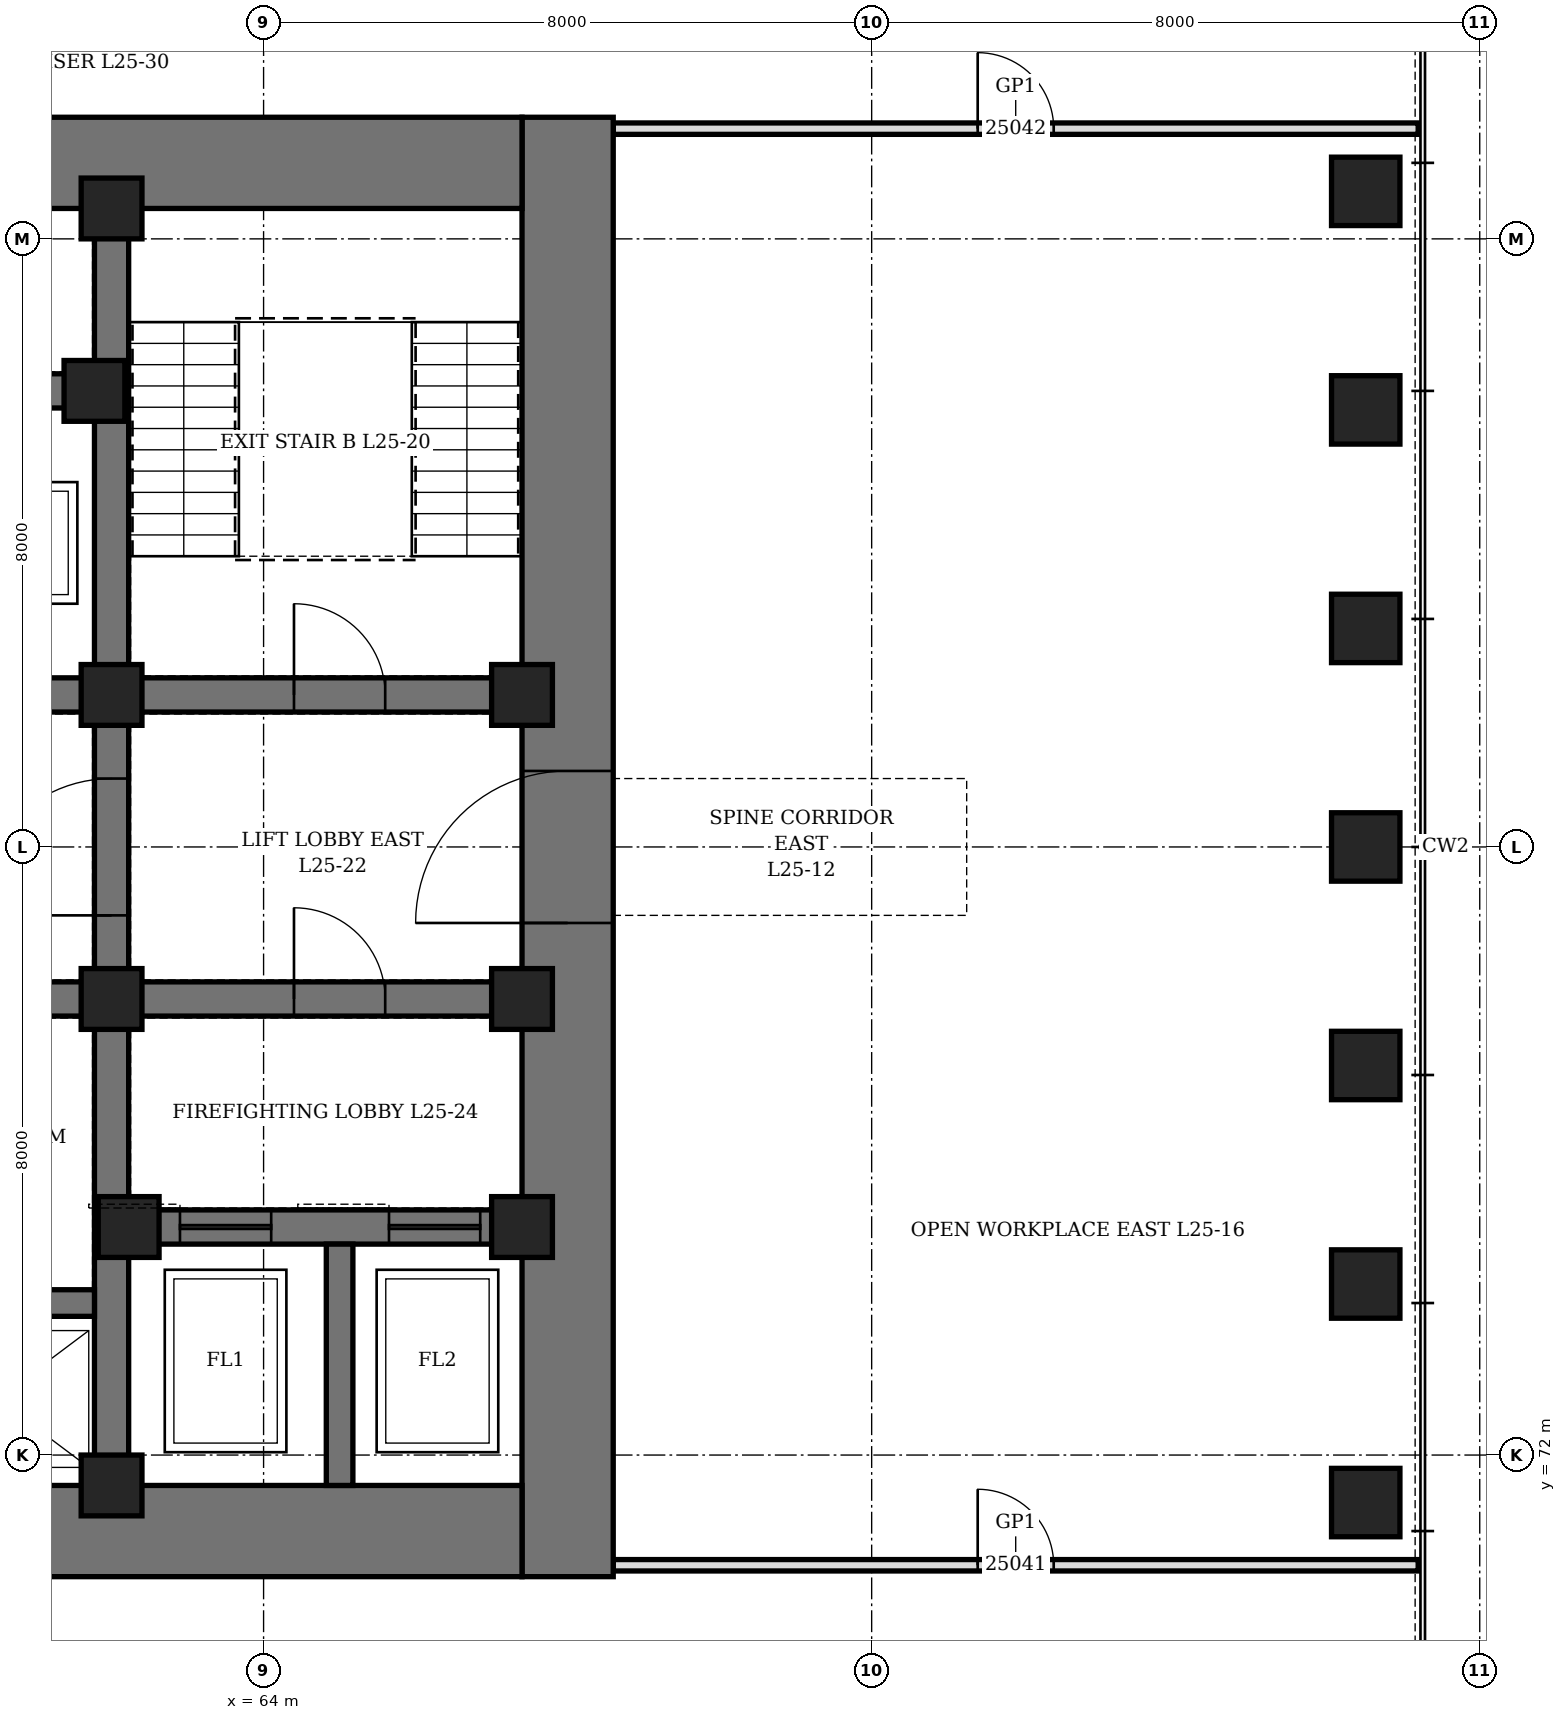
"""IFC4 building model, lengths in metres.
Left out: names, types, materials, properties, quantities, classifications, styles, units other than length and angle.
Written with IfcOpenShell. Run it as: python <this file> out.ifc"""

import sys

from ifc_helpers import new_model, si_unit, direction, frame, frame_2d, origin, origin_2d, place, context, subcontext, project, spatial, rectangle, hollow_rectangle, extrude, element, fill, save


model = new_model("IFC4")
c1 = context("Model", 3, precision=1e-05, world=origin(), true_north=direction((0.0, 1.0)))
c2 = subcontext(c1, "Body", "Model", "MODEL_VIEW")
j1 = project(units=[si_unit("LENGTHUNIT", "METRE"), si_unit("PLANEANGLEUNIT", "RADIAN")], contexts=[c1])
p1 = place(None, origin())
s1 = spatial("IfcSite", under=j1, at=p1, CompositionType="ELEMENT")
p2 = place(p1, origin())
s2 = spatial("IfcBuilding", under=s1, at=p2, CompositionType="ELEMENT")
p3 = place(p2, frame((0.0, 0.0, 116.5)))
s3 = spatial("IfcBuildingStorey", under=s2, at=p3, CompositionType="ELEMENT", Elevation=116.5)
for number, where, z_axis, x_axis in (
    (1, (78.5, 71.375, 0.0), (0.0, 0.0, 1.0), (0.0, 1.0, 0.0)),
    (2, (78.5, 74.25, 0.0), (0.0, 0.0, 1.0), (0.0, 1.0, 0.0)),
    (3, (78.5, 77.125, 0.0), (0.0, 0.0, 1.0), (0.0, 1.0, 0.0)),
    (4, (78.5, 80.0, 0.0), (0.0, 0.0, 1.0), (0.0, 1.0, 0.0)),
    (5, (78.5, 82.875, 0.0), (0.0, 0.0, 1.0), (0.0, 1.0, 0.0)),
    (6, (78.5, 85.75, 0.0), (0.0, 0.0, 1.0), (0.0, 1.0, 0.0)),
    (7, (78.5, 88.625, 0.0), (0.0, 0.0, 1.0), (0.0, 1.0, 0.0)),
):
    element("IfcColumn", number, at=place(p3, frame(where, z_axis=z_axis, x_axis=x_axis)), inside=s3, PredefinedType="COLUMN", context=c2, shape_type="SweptSolid", body=[
        extrude(hollow_rectangle(XDim=0.9, YDim=0.9, WallThickness=0.15, at=origin_2d()), origin(), (0.0, 0.0, 1.0), 4.2),
    ])
p4 = place(p3, frame((68.0, 70.4, 0.0), z_axis=(0.0, 0.0, 1.0), x_axis=(0.0, 1.0, 0.0)))
e8 = element("IfcWall", 8, at=p4, inside=s3, PredefinedType="SHEAR", context=c2, shape_type="SweptSolid", body=[
    extrude(rectangle(XDim=19.2, YDim=1.2, at=frame_2d((9.6, 0.0))), origin(), (0.0, 0.0, 1.0), 4.2),
])
p5 = place(p4, frame((8.6, 0.0, 0.0)))
e9 = element("IfcOpeningElement", 9, at=p5, cuts=e8, PredefinedType="OPENING", context=c2, shape_type="SweptSolid", body=[
    extrude(rectangle(XDim=2.0, YDim=2.4, at=frame_2d((1.0, 1.2))), frame((0.0, 0.61, 0.0), z_axis=(0.0, -1.0, 0.0), x_axis=(1.0, 0.0, 0.0)), (0.0, 0.0, 1.0), 1.22),
])
p6 = place(p3, frame((44.6, 71.0, 0.0), z_axis=(0.0, 0.0, 1.0), x_axis=(1.0, 0.0, 0.0)))
e10 = element("IfcWall", 10, at=p6, inside=s3, PredefinedType="SHEAR", context=c2, shape_type="SweptSolid", body=[
    extrude(rectangle(XDim=22.8, YDim=1.2, at=frame_2d((11.4, 0.0))), origin(), (0.0, 0.0, 1.0), 4.2),
])
p7 = place(p3, frame((44.6, 89.0, 0.0), z_axis=(0.0, 0.0, 1.0), x_axis=(1.0, 0.0, 0.0)))
e11 = element("IfcWall", 11, at=p7, inside=s3, PredefinedType="SHEAR", context=c2, shape_type="SweptSolid", body=[
    extrude(rectangle(XDim=22.8, YDim=1.2, at=frame_2d((11.4, 0.0))), origin(), (0.0, 0.0, 1.0), 4.2),
])
p8 = place(p7, frame((9.475, 0.0, 0.0)))
e12 = element("IfcOpeningElement", 12, at=p8, cuts=e11, PredefinedType="OPENING", context=c2, shape_type="SweptSolid", body=[
    extrude(rectangle(XDim=1.0, YDim=2.1, at=frame_2d((0.5, 1.05))), frame((0.0, 0.61, 0.0), z_axis=(0.0, -1.0, 0.0), x_axis=(1.0, 0.0, 0.0)), (0.0, 0.0, 1.0), 1.22),
])
p9 = place(p7, frame((6.65, 0.0, 0.0)))
e13 = element("IfcOpeningElement", 13, at=p9, cuts=e11, PredefinedType="OPENING", context=c2, shape_type="SweptSolid", body=[
    extrude(rectangle(XDim=0.9, YDim=2.1, at=frame_2d((0.45, 1.05))), frame((0.0, 0.61, 0.0), z_axis=(0.0, -1.0, 0.0), x_axis=(1.0, 0.0, 0.0)), (0.0, 0.0, 1.0), 1.22),
])
p10 = place(p7, frame((12.025, 0.0, 0.0)))
e14 = element("IfcOpeningElement", 14, at=p10, cuts=e11, PredefinedType="OPENING", context=c2, shape_type="SweptSolid", body=[
    extrude(rectangle(XDim=0.9, YDim=2.1, at=frame_2d((0.45, 1.05))), frame((0.0, 0.61, 0.0), z_axis=(0.0, -1.0, 0.0), x_axis=(1.0, 0.0, 0.0)), (0.0, 0.0, 1.0), 1.22),
])
p11 = place(p7, frame((13.962, 0.0, 0.0)))
e15 = element("IfcOpeningElement", 15, at=p11, cuts=e11, PredefinedType="OPENING", context=c2, shape_type="SweptSolid", body=[
    extrude(rectangle(XDim=0.9, YDim=2.1, at=frame_2d((0.45, 1.05))), frame((0.0, 0.61, 0.0), z_axis=(0.0, -1.0, 0.0), x_axis=(1.0, 0.0, 0.0)), (0.0, 0.0, 1.0), 1.22),
])
p12 = place(p3, frame((62.0, 71.6, 0.0), z_axis=(0.0, 0.0, 1.0), x_axis=(0.0, 1.0, 0.0)))
e16 = element("IfcWall", 16, at=p12, inside=s3, PredefinedType="SHEAR", context=c2, shape_type="SweptSolid", body=[
    extrude(rectangle(XDim=16.8, YDim=0.45, at=frame_2d((8.4, 0.0))), origin(), (0.0, 0.0, 1.0), 4.2),
])
p13 = place(p12, frame((7.5, 0.0, 0.0)))
e17 = element("IfcOpeningElement", 17, at=p13, cuts=e16, PredefinedType="OPENING", context=c2, shape_type="SweptSolid", body=[
    extrude(rectangle(XDim=1.8, YDim=2.4, at=frame_2d((0.9, 1.2))), frame((0.0, 0.235, 0.0), z_axis=(0.0, -1.0, 0.0), x_axis=(1.0, 0.0, 0.0)), (0.0, 0.0, 1.0), 0.47),
])
p14 = place(p3, frame((62.225, 75.0, 0.0), z_axis=(0.0, 0.0, 1.0), x_axis=(1.0, 0.0, 0.0)))
e18 = element("IfcWall", 18, at=p14, inside=s3, PredefinedType="SHEAR", context=c2, shape_type="SweptSolid", body=[
    extrude(rectangle(XDim=5.175, YDim=0.45, at=frame_2d((2.587, 0.0))), origin(), (0.0, 0.0, 1.0), 4.2),
])
p15 = place(p14, frame((0.675, 0.0, 0.0)))
e19 = element("IfcOpeningElement", 19, at=p15, cuts=e18, PredefinedType="OPENING", context=c2, shape_type="SweptSolid", body=[
    extrude(rectangle(XDim=1.2, YDim=2.2, at=frame_2d((0.6, 1.1))), frame((0.0, 0.235, 0.0), z_axis=(0.0, -1.0, 0.0), x_axis=(1.0, 0.0, 0.0)), (0.0, 0.0, 1.0), 0.47),
])
p16 = place(p14, frame((3.425, 0.0, 0.0)))
e20 = element("IfcOpeningElement", 20, at=p16, cuts=e18, PredefinedType="OPENING", context=c2, shape_type="SweptSolid", body=[
    extrude(rectangle(XDim=1.2, YDim=2.2, at=frame_2d((0.6, 1.1))), frame((0.0, 0.235, 0.0), z_axis=(0.0, -1.0, 0.0), x_axis=(1.0, 0.0, 0.0)), (0.0, 0.0, 1.0), 0.47),
])
p17 = place(p3, frame((62.225, 78.0, 0.0), z_axis=(0.0, 0.0, 1.0), x_axis=(1.0, 0.0, 0.0)))
e21 = element("IfcWall", 21, at=p17, inside=s3, PredefinedType="SHEAR", context=c2, shape_type="SweptSolid", body=[
    extrude(rectangle(XDim=5.175, YDim=0.45, at=frame_2d((2.587, 0.0))), origin(), (0.0, 0.0, 1.0), 4.2),
])
p18 = place(p17, frame((2.175, 0.0, 0.0)))
e22 = element("IfcOpeningElement", 22, at=p18, cuts=e21, PredefinedType="OPENING", context=c2, shape_type="SweptSolid", body=[
    extrude(rectangle(XDim=1.2, YDim=2.1, at=frame_2d((0.6, 1.05))), frame((0.0, 0.235, 0.0), z_axis=(0.0, -1.0, 0.0), x_axis=(1.0, 0.0, 0.0)), (0.0, 0.0, 1.0), 0.47),
])
p19 = place(p3, frame((62.225, 82.0, 0.0), z_axis=(0.0, 0.0, 1.0), x_axis=(1.0, 0.0, 0.0)))
e23 = element("IfcWall", 23, at=p19, inside=s3, PredefinedType="SHEAR", context=c2, shape_type="SweptSolid", body=[
    extrude(rectangle(XDim=5.175, YDim=0.45, at=frame_2d((2.587, 0.0))), origin(), (0.0, 0.0, 1.0), 4.2),
])
p20 = place(p19, frame((2.175, 0.0, 0.0)))
e24 = element("IfcOpeningElement", 24, at=p20, cuts=e23, PredefinedType="OPENING", context=c2, shape_type="SweptSolid", body=[
    extrude(rectangle(XDim=1.2, YDim=2.1, at=frame_2d((0.6, 1.05))), frame((0.0, 0.235, 0.0), z_axis=(0.0, -1.0, 0.0), x_axis=(1.0, 0.0, 0.0)), (0.0, 0.0, 1.0), 0.47),
])
p21 = place(p3, frame((50.225, 78.0, 0.0), z_axis=(0.0, 0.0, 1.0), x_axis=(1.0, 0.0, 0.0)))
e25 = element("IfcWall", 25, at=p21, inside=s3, PredefinedType="SHEAR", context=c2, shape_type="SweptSolid", body=[
    extrude(rectangle(XDim=11.55, YDim=0.45, at=frame_2d((5.775, 0.0))), origin(), (0.0, 0.0, 1.0), 4.2),
])
p22 = place(p21, frame((0.825, 0.0, 0.0)))
e26 = element("IfcOpeningElement", 26, at=p22, cuts=e25, PredefinedType="OPENING", context=c2, shape_type="SweptSolid", body=[
    extrude(rectangle(XDim=0.9, YDim=2.1, at=frame_2d((0.45, 1.05))), frame((0.0, 0.235, 0.0), z_axis=(0.0, -1.0, 0.0), x_axis=(1.0, 0.0, 0.0)), (0.0, 0.0, 1.0), 0.47),
])
p23 = place(p21, frame((3.825, 0.0, 0.0)))
e27 = element("IfcOpeningElement", 27, at=p23, cuts=e25, PredefinedType="OPENING", context=c2, shape_type="SweptSolid", body=[
    extrude(rectangle(XDim=0.9, YDim=2.1, at=frame_2d((0.45, 1.05))), frame((0.0, 0.235, 0.0), z_axis=(0.0, -1.0, 0.0), x_axis=(1.0, 0.0, 0.0)), (0.0, 0.0, 1.0), 0.47),
])
p24 = place(p21, frame((6.825, 0.0, 0.0)))
e28 = element("IfcOpeningElement", 28, at=p24, cuts=e25, PredefinedType="OPENING", context=c2, shape_type="SweptSolid", body=[
    extrude(rectangle(XDim=0.9, YDim=2.1, at=frame_2d((0.45, 1.05))), frame((0.0, 0.235, 0.0), z_axis=(0.0, -1.0, 0.0), x_axis=(1.0, 0.0, 0.0)), (0.0, 0.0, 1.0), 0.47),
])
p25 = place(p21, frame((9.825, 0.0, 0.0)))
e29 = element("IfcOpeningElement", 29, at=p25, cuts=e25, PredefinedType="OPENING", context=c2, shape_type="SweptSolid", body=[
    extrude(rectangle(XDim=0.9, YDim=2.1, at=frame_2d((0.45, 1.05))), frame((0.0, 0.235, 0.0), z_axis=(0.0, -1.0, 0.0), x_axis=(1.0, 0.0, 0.0)), (0.0, 0.0, 1.0), 0.47),
])
p26 = place(p3, frame((50.225, 82.0, 0.0), z_axis=(0.0, 0.0, 1.0), x_axis=(1.0, 0.0, 0.0)))
e30 = element("IfcWall", 30, at=p26, inside=s3, PredefinedType="SHEAR", context=c2, shape_type="SweptSolid", body=[
    extrude(rectangle(XDim=11.55, YDim=0.45, at=frame_2d((5.775, 0.0))), origin(), (0.0, 0.0, 1.0), 4.2),
])
p27 = place(p26, frame((0.725, 0.0, 0.0)))
e31 = element("IfcOpeningElement", 31, at=p27, cuts=e30, PredefinedType="OPENING", context=c2, shape_type="SweptSolid", body=[
    extrude(rectangle(XDim=1.1, YDim=2.2, at=frame_2d((0.55, 1.1))), frame((0.0, 0.235, 0.0), z_axis=(0.0, -1.0, 0.0), x_axis=(1.0, 0.0, 0.0)), (0.0, 0.0, 1.0), 0.47),
])
p28 = place(p26, frame((3.725, 0.0, 0.0)))
e32 = element("IfcOpeningElement", 32, at=p28, cuts=e30, PredefinedType="OPENING", context=c2, shape_type="SweptSolid", body=[
    extrude(rectangle(XDim=1.1, YDim=2.2, at=frame_2d((0.55, 1.1))), frame((0.0, 0.235, 0.0), z_axis=(0.0, -1.0, 0.0), x_axis=(1.0, 0.0, 0.0)), (0.0, 0.0, 1.0), 0.47),
])
p29 = place(p26, frame((6.725, 0.0, 0.0)))
e33 = element("IfcOpeningElement", 33, at=p29, cuts=e30, PredefinedType="OPENING", context=c2, shape_type="SweptSolid", body=[
    extrude(rectangle(XDim=1.1, YDim=2.2, at=frame_2d((0.55, 1.1))), frame((0.0, 0.235, 0.0), z_axis=(0.0, -1.0, 0.0), x_axis=(1.0, 0.0, 0.0)), (0.0, 0.0, 1.0), 0.47),
])
p30 = place(p26, frame((9.725, 0.0, 0.0)))
e34 = element("IfcOpeningElement", 34, at=p30, cuts=e30, PredefinedType="OPENING", context=c2, shape_type="SweptSolid", body=[
    extrude(rectangle(XDim=1.1, YDim=2.2, at=frame_2d((0.55, 1.1))), frame((0.0, 0.235, 0.0), z_axis=(0.0, -1.0, 0.0), x_axis=(1.0, 0.0, 0.0)), (0.0, 0.0, 1.0), 0.47),
])
p31 = place(p3, frame((50.225, 86.0, 0.0), z_axis=(0.0, 0.0, 1.0), x_axis=(1.0, 0.0, 0.0)))
e35 = element("IfcWall", 35, at=p31, inside=s3, PredefinedType="SHEAR", context=c2, shape_type="SweptSolid", body=[
    extrude(rectangle(XDim=11.55, YDim=0.45, at=frame_2d((5.775, 0.0))), origin(), (0.0, 0.0, 1.0), 4.2),
])
p32 = place(p3, frame((50.225, 74.0, 0.0), z_axis=(0.0, 0.0, 1.0), x_axis=(1.0, 0.0, 0.0)))
e36 = element("IfcWall", 36, at=p32, inside=s3, PredefinedType="SHEAR", context=c2, shape_type="SweptSolid", body=[
    extrude(rectangle(XDim=11.55, YDim=0.35, at=frame_2d((5.775, 0.0))), origin(), (0.0, 0.0, 1.0), 4.2),
])
p33 = place(p3, frame((65.0, 71.6, 0.0), z_axis=(0.0, 0.0, 1.0), x_axis=(0.0, 1.0, 0.0)))
e37 = element("IfcWall", 37, at=p33, inside=s3, PredefinedType="SHEAR", context=c2, shape_type="SweptSolid", body=[
    extrude(rectangle(XDim=3.175, YDim=0.35, at=frame_2d((1.587, 0.0))), origin(), (0.0, 0.0, 1.0), 4.2),
])
for number, where, z_axis, x_axis in (
    (38, (61.775, 86.0, 0.0), (0.0, 0.0, 1.0), (1.0, 0.0, 0.0)),
    (39, (62.0, 71.6, 0.0), (0.0, 0.0, 1.0), (1.0, 0.0, 0.0)),
    (40, (62.0, 78.0, 0.0), (0.0, 0.0, 1.0), (1.0, 0.0, 0.0)),
    (41, (62.0, 82.0, 0.0), (0.0, 0.0, 1.0), (1.0, 0.0, 0.0)),
    (42, (62.0, 88.4, 0.0), (0.0, 0.0, 1.0), (1.0, 0.0, 0.0)),
    (43, (62.225, 75.0, 0.0), (0.0, 0.0, 1.0), (1.0, 0.0, 0.0)),
    (44, (67.4, 75.0, 0.0), (0.0, 0.0, 1.0), (1.0, 0.0, 0.0)),
    (45, (67.4, 78.0, 0.0), (0.0, 0.0, 1.0), (1.0, 0.0, 0.0)),
    (46, (67.4, 82.0, 0.0), (0.0, 0.0, 1.0), (1.0, 0.0, 0.0)),
):
    element("IfcColumn", number, at=place(p3, frame(where, z_axis=z_axis, x_axis=x_axis)), inside=s3, PredefinedType="COLUMN", context=c2, shape_type="SweptSolid", body=[
        extrude(hollow_rectangle(XDim=0.8, YDim=0.8, WallThickness=0.1, at=origin_2d()), origin(), (0.0, 0.0, 1.0), 4.2),
    ])
p34 = place(p3, frame((68.6, 70.55, 0.0), z_axis=(0.0, 0.0, 1.0), x_axis=(1.0, 0.0, 0.0)))
e47 = element("IfcWall", 47, at=p34, inside=s3, PredefinedType="PARTITIONING", context=c2, shape_type="SweptSolid", body=[
    extrude(rectangle(XDim=10.59, YDim=0.15, at=frame_2d((5.295, 0.0))), origin(), (0.0, 0.0, 1.0), 4.04),
])
p35 = place(p34, frame((4.795, 0.0, 0.0)))
e48 = element("IfcOpeningElement", 48, at=p35, cuts=e47, PredefinedType="OPENING", context=c2, shape_type="SweptSolid", body=[
    extrude(rectangle(XDim=1.0, YDim=2.4, at=frame_2d((0.5, 1.2))), frame((0.0, 0.085, 0.0), z_axis=(0.0, -1.0, 0.0), x_axis=(1.0, 0.0, 0.0)), (0.0, 0.0, 1.0), 0.17),
])
p36 = place(p3, frame((68.6, 89.45, 0.0), z_axis=(0.0, 0.0, 1.0), x_axis=(1.0, 0.0, 0.0)))
e49 = element("IfcWall", 49, at=p36, inside=s3, PredefinedType="PARTITIONING", context=c2, shape_type="SweptSolid", body=[
    extrude(rectangle(XDim=10.59, YDim=0.15, at=frame_2d((5.295, 0.0))), origin(), (0.0, 0.0, 1.0), 4.04),
])
p37 = place(p36, frame((4.795, 0.0, 0.0)))
e50 = element("IfcOpeningElement", 50, at=p37, cuts=e49, PredefinedType="OPENING", context=c2, shape_type="SweptSolid", body=[
    extrude(rectangle(XDim=1.0, YDim=2.4, at=frame_2d((0.5, 1.2))), frame((0.0, 0.085, 0.0), z_axis=(0.0, -1.0, 0.0), x_axis=(1.0, 0.0, 0.0)), (0.0, 0.0, 1.0), 0.17),
])
p38 = place(p20, origin())
e51 = element("IfcDoor", 51, at=p38, inside=s3, OperationType="SINGLE_SWING_LEFT", PredefinedType="DOOR", context=c2, shape_type="SweptSolid", body=[
    extrude(rectangle(XDim=1.2, YDim=2.1, at=frame_2d((0.6, 1.05))), frame((0.0, 0.225, 0.0), z_axis=(0.0, -1.0, 0.0), x_axis=(1.0, 0.0, 0.0)), (0.0, 0.0, 1.0), 0.449),
])
fill(e24, e51)
p39 = place(p5, origin())
e52 = element("IfcDoor", 52, at=p39, inside=s3, OperationType="DOUBLE_DOOR_SINGLE_SWING", PredefinedType="DOOR", context=c2, shape_type="SweptSolid", body=[
    extrude(rectangle(XDim=2.0, YDim=2.4, at=frame_2d((1.0, 1.2))), frame((0.0, 0.35, 0.0), z_axis=(0.0, -1.0, 0.0), x_axis=(1.0, 0.0, 0.0)), (0.0, 0.0, 1.0), 0.7),
])
fill(e9, e52)
p40 = place(p13, origin())
e53 = element("IfcDoor", 53, at=p40, inside=s3, OperationType="DOUBLE_DOOR_SINGLE_SWING", PredefinedType="DOOR", context=c2, shape_type="SweptSolid", body=[
    extrude(rectangle(XDim=1.8, YDim=2.4, at=frame_2d((0.9, 1.2))), frame((0.0, 0.225, 0.0), z_axis=(0.0, -1.0, 0.0), x_axis=(1.0, 0.0, 0.0)), (0.0, 0.0, 1.0), 0.449),
])
fill(e17, e53)
p41 = place(p18, origin())
e54 = element("IfcDoor", 54, at=p41, inside=s3, OperationType="SINGLE_SWING_RIGHT", PredefinedType="DOOR", context=c2, shape_type="SweptSolid", body=[
    extrude(rectangle(XDim=1.2, YDim=2.1, at=frame_2d((0.6, 1.05))), frame((0.0, 0.225, 0.0), z_axis=(0.0, -1.0, 0.0), x_axis=(1.0, 0.0, 0.0)), (0.0, 0.0, 1.0), 0.449),
])
fill(e22, e54)
p42 = place(p15, origin())
e55 = element("IfcDoor", 55, at=p42, inside=s3, OperationType="SLIDING_TO_LEFT", PredefinedType="DOOR", context=c2, shape_type="SweptSolid", body=[
    extrude(rectangle(XDim=1.2, YDim=2.2, at=frame_2d((0.6, 1.1))), frame((0.0, 0.225, 0.0), z_axis=(0.0, -1.0, 0.0), x_axis=(1.0, 0.0, 0.0)), (0.0, 0.0, 1.0), 0.449),
])
fill(e19, e55)
p43 = place(p16, origin())
e56 = element("IfcDoor", 56, at=p43, inside=s3, OperationType="SLIDING_TO_LEFT", PredefinedType="DOOR", context=c2, shape_type="SweptSolid", body=[
    extrude(rectangle(XDim=1.2, YDim=2.2, at=frame_2d((0.6, 1.1))), frame((0.0, 0.225, 0.0), z_axis=(0.0, -1.0, 0.0), x_axis=(1.0, 0.0, 0.0)), (0.0, 0.0, 1.0), 0.449),
])
fill(e20, e56)
p44 = place(p35, origin())
e57 = element("IfcDoor", 57, at=p44, inside=s3, OperationType="SINGLE_SWING_RIGHT", PredefinedType="DOOR", context=c2, shape_type="SweptSolid", body=[
    extrude(rectangle(XDim=1.0, YDim=2.4, at=frame_2d((0.5, 1.2))), frame((0.0, 0.075, 0.0), z_axis=(0.0, -1.0, 0.0), x_axis=(1.0, 0.0, 0.0)), (0.0, 0.0, 1.0), 0.149),
])
fill(e48, e57)
p45 = place(p37, origin())
e58 = element("IfcDoor", 58, at=p45, inside=s3, OperationType="SINGLE_SWING_RIGHT", PredefinedType="DOOR", context=c2, shape_type="SweptSolid", body=[
    extrude(rectangle(XDim=1.0, YDim=2.4, at=frame_2d((0.5, 1.2))), frame((0.0, 0.075, 0.0), z_axis=(0.0, -1.0, 0.0), x_axis=(1.0, 0.0, 0.0)), (0.0, 0.0, 1.0), 0.149),
])
fill(e50, e58)
save(model, sys.argv[1])
